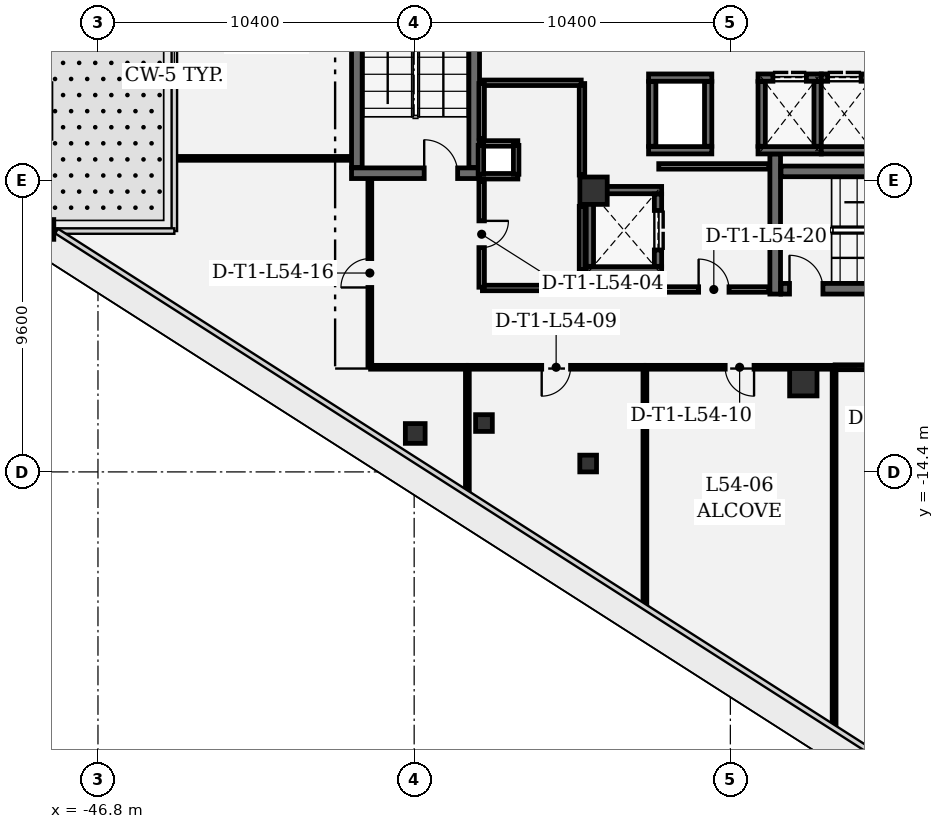
"""IFC4 building model, lengths in metres.
Left out: names, types, materials, properties, quantities, classifications, styles, units other than length and angle.
Written with IfcOpenShell. Run it as: python <this file> out.ifc"""

import sys

from ifc_helpers import new_model, si_unit, direction, frame, frame_2d, origin, origin_2d, place, context, subcontext, project, spatial, rectangle, extrude, element, fill, save


model = new_model("IFC4")
c1 = context("Model", 3, precision=1e-05, world=origin(), true_north=direction((0.0, 1.0)))
c2 = subcontext(c1, "Body", "Model", "MODEL_VIEW")
j1 = project(units=[si_unit("LENGTHUNIT", "METRE"), si_unit("PLANEANGLEUNIT", "RADIAN")], contexts=[c1])
p1 = place(None, origin())
s1 = spatial("IfcSite", under=j1, at=p1, CompositionType="ELEMENT")
p2 = place(p1, origin())
s2 = spatial("IfcBuilding", under=s1, at=p2, CompositionType="ELEMENT")
p3 = place(p2, frame((0.0, 0.0, 233.4)))
s3 = spatial("IfcBuildingStorey", under=s2, at=p3, CompositionType="ELEMENT", Elevation=233.4)
for number, where, z_axis, x_axis in (
    (1, (-23.6, -11.45, 0.0), (0.0, 0.0, 1.0), (1.0, 0.0, 0.0)),
    (2, (-30.5, -5.15, 0.0), (0.0, 0.0, 1.0), (1.0, 0.0, 0.0)),
):
    element("IfcColumn", number, at=place(p3, frame(where, z_axis=z_axis, x_axis=x_axis)), inside=s3, PredefinedType="COLUMN", context=c2, shape_type="SweptSolid", body=[
        extrude(rectangle(XDim=0.9, YDim=0.9, at=origin_2d()), origin(), (0.0, 0.0, 1.0), 4.05),
    ])
for number, where, z_axis, x_axis in (
    (3, (-48.578, -6.425, 0.0), (0.0, 0.0, 1.0), (1.0, 0.0, 0.0)),
    (4, (-36.365, -13.135, 0.0), (0.0, 0.0, 1.0), (1.0, 0.0, 0.0)),
):
    element("IfcColumn", number, at=place(p3, frame(where, z_axis=z_axis, x_axis=x_axis)), inside=s3, PredefinedType="COLUMN", context=c2, shape_type="SweptSolid", body=[
        extrude(rectangle(XDim=0.65, YDim=0.65, at=origin_2d()), origin(), (0.0, 0.0, 1.0), 4.05),
    ])
for number, where, z_axis, x_axis in (
    (5, (-34.104, -12.792, 0.0), (0.0, 0.0, 1.0), (1.0, 0.0, 0.0)),
    (6, (-30.677, -14.124, 0.0), (0.0, 0.0, 1.0), (1.0, 0.0, 0.0)),
):
    element("IfcColumn", number, at=place(p3, frame(where, z_axis=z_axis, x_axis=x_axis)), inside=s3, PredefinedType="COLUMN", context=c2, shape_type="SweptSolid", body=[
        extrude(rectangle(XDim=0.55, YDim=0.55, at=origin_2d()), origin(), (0.0, 0.0, 1.0), 4.05),
    ])
p4 = place(p3, frame((-24.525, -3.94, 0.0), z_axis=(0.0, 0.0, 1.0), x_axis=(0.0, -1.0, 0.0)))
e7 = element("IfcWall", 7, at=p4, inside=s3, PredefinedType="SHEAR", context=c2, shape_type="SweptSolid", body=[
    extrude(rectangle(XDim=4.61, YDim=0.35, at=frame_2d((2.305, 0.0))), origin(), (0.0, 0.0, 1.0), 3.78),
])
p5 = place(p3, frame((-24.335, -8.375, 0.0), z_axis=(0.0, 0.0, 1.0), x_axis=(1.0, 0.0, 0.0)))
e8 = element("IfcWall", 8, at=p5, inside=s3, PredefinedType="SHEAR", context=c2, shape_type="SweptSolid", body=[
    extrude(rectangle(XDim=8.12, YDim=0.35, at=frame_2d((4.06, 0.0))), origin(), (0.0, 0.0, 1.0), 3.78),
])
p6 = place(p5, frame((0.28, 0.0, 0.0)))
e9 = element("IfcOpeningElement", 9, at=p6, cuts=e8, PredefinedType="OPENING", context=c2, shape_type="SweptSolid", body=[
    extrude(rectangle(XDim=1.1, YDim=2.2, at=frame_2d((0.55, 1.1))), frame((0.0, 0.185, 0.0), z_axis=(0.0, -1.0, 0.0), x_axis=(1.0, 0.0, 0.0)), (0.0, 0.0, 1.0), 0.37),
])
p7 = place(p3, frame((-16.215, -4.515, 0.0), z_axis=(0.0, 0.0, 1.0), x_axis=(-1.0, 0.0, 0.0)))
e10 = element("IfcWall", 10, at=p7, inside=s3, PredefinedType="SHEAR", context=c2, shape_type="SweptSolid", body=[
    extrude(rectangle(XDim=8.12, YDim=0.35, at=frame_2d((4.06, 0.0))), origin(), (0.0, 0.0, 1.0), 3.78),
])
p8 = place(p3, frame((-38.46, -4.575, 0.0), z_axis=(0.0, 0.0, 1.0), x_axis=(1.0, 0.0, 0.0)))
e11 = element("IfcWall", 11, at=p8, inside=s3, PredefinedType="SHEAR", context=c2, shape_type="SweptSolid", body=[
    extrude(rectangle(XDim=4.21, YDim=0.35, at=frame_2d((2.105, 0.0))), origin(), (0.0, 0.0, 1.0), 3.78),
])
p9 = place(p8, frame((2.39, 0.0, 0.0)))
e12 = element("IfcOpeningElement", 12, at=p9, cuts=e11, PredefinedType="OPENING", context=c2, shape_type="SweptSolid", body=[
    extrude(rectangle(XDim=1.1, YDim=2.2, at=frame_2d((0.55, 1.1))), frame((0.0, 0.185, 0.0), z_axis=(0.0, -1.0, 0.0), x_axis=(1.0, 0.0, 0.0)), (0.0, 0.0, 1.0), 0.37),
])
for number, where, z_axis, x_axis in (
    (13, (-34.425, -4.385, 0.0), (0.0, 0.0, 1.0), (0.0, 1.0, 0.0)),
    (14, (-38.285, 4.385, 0.0), (0.0, 0.0, 1.0), (0.0, -1.0, 0.0)),
):
    element("IfcWall", number, at=place(p3, frame(where, z_axis=z_axis, x_axis=x_axis)), inside=s3, PredefinedType="SHEAR", context=c2, shape_type="SweptSolid", body=[
        extrude(rectangle(XDim=8.77, YDim=0.35, at=frame_2d((4.385, 0.0))), origin(), (0.0, 0.0, 1.0), 3.78),
    ])
for number, where, z_axis, x_axis in (
    (15, (-28.26, -7.77, 0.0), (0.0, 0.0, 1.0), (-1.0, 0.0, 0.0)),
    (16, (-30.74, -5.13, 0.0), (0.0, 0.0, 1.0), (1.0, 0.0, 0.0)),
):
    element("IfcWall", number, at=place(p3, frame(where, z_axis=z_axis, x_axis=x_axis)), inside=s3, PredefinedType="SHEAR", context=c2, shape_type="SweptSolid", body=[
        extrude(rectangle(XDim=2.48, YDim=0.24, at=frame_2d((1.24, 0.0))), origin(), (0.0, 0.0, 1.0), 3.78),
    ])
p10 = place(p3, frame((-30.62, -7.638, 0.0), z_axis=(0.0, 0.0, 1.0), x_axis=(0.0, 1.0, 0.0)))
e17 = element("IfcWall", 17, at=p10, inside=s3, PredefinedType="SHEAR", context=c2, shape_type="SweptSolid", body=[
    extrude(rectangle(XDim=2.376, YDim=0.24, at=frame_2d((1.188, 0.0))), origin(), (0.0, 0.0, 1.0), 3.78),
])
p11 = place(p3, frame((-28.38, -5.262, 0.0), z_axis=(0.0, 0.0, 1.0), x_axis=(0.0, -1.0, 0.0)))
e18 = element("IfcWall", 18, at=p11, inside=s3, PredefinedType="SHEAR", context=c2, shape_type="SweptSolid", body=[
    extrude(rectangle(XDim=2.376, YDim=0.24, at=frame_2d((1.188, 0.0))), origin(), (0.0, 0.0, 1.0), 3.78),
])
p12 = place(p11, frame((0.538, 0.0, 0.0)))
e19 = element("IfcOpeningElement", 19, at=p12, cuts=e18, PredefinedType="OPENING", context=c2, shape_type="SweptSolid", body=[
    extrude(rectangle(XDim=1.3, YDim=2.3, at=frame_2d((0.65, 1.15))), frame((0.0, 0.13, 0.0), z_axis=(0.0, -1.0, 0.0), x_axis=(1.0, 0.0, 0.0)), (0.0, 0.0, 1.0), 0.26),
])
for number, where, z_axis, x_axis in (
    (20, (-26.61, -3.82, 0.0), (0.0, 0.0, 1.0), (-1.0, 0.0, 0.0)),
    (21, (-28.69, -1.43, 0.0), (0.0, 0.0, 1.0), (1.0, 0.0, 0.0)),
):
    element("IfcWall", number, at=place(p3, frame(where, z_axis=z_axis, x_axis=x_axis)), inside=s3, PredefinedType="SHEAR", context=c2, shape_type="SweptSolid", body=[
        extrude(rectangle(XDim=2.08, YDim=0.24, at=frame_2d((1.04, 0.0))), origin(), (0.0, 0.0, 1.0), 3.78),
    ])
for number, where, z_axis, x_axis in (
    (22, (-28.57, -3.688, 0.0), (0.0, 0.0, 1.0), (0.0, 1.0, 0.0)),
    (23, (-26.73, -1.562, 0.0), (0.0, 0.0, 1.0), (0.0, -1.0, 0.0)),
):
    element("IfcWall", number, at=place(p3, frame(where, z_axis=z_axis, x_axis=x_axis)), inside=s3, PredefinedType="SHEAR", context=c2, shape_type="SweptSolid", body=[
        extrude(rectangle(XDim=2.126, YDim=0.24, at=frame_2d((1.063, 0.0))), origin(), (0.0, 0.0, 1.0), 3.78),
    ])
p13 = place(p3, frame((-23.01, -3.82, 0.0), z_axis=(0.0, 0.0, 1.0), x_axis=(-1.0, 0.0, 0.0)))
e24 = element("IfcWall", 24, at=p13, inside=s3, PredefinedType="SHEAR", context=c2, shape_type="SweptSolid", body=[
    extrude(rectangle(XDim=2.08, YDim=0.24, at=frame_2d((1.04, 0.0))), origin(), (0.0, 0.0, 1.0), 3.78),
])
p14 = place(p3, frame((-25.09, -1.43, 0.0), z_axis=(0.0, 0.0, 1.0), x_axis=(1.0, 0.0, 0.0)))
e25 = element("IfcWall", 25, at=p14, inside=s3, PredefinedType="SHEAR", context=c2, shape_type="SweptSolid", body=[
    extrude(rectangle(XDim=2.08, YDim=0.24, at=frame_2d((1.04, 0.0))), origin(), (0.0, 0.0, 1.0), 3.78),
])
p15 = place(p14, frame((0.49, 0.0, 0.0)))
e26 = element("IfcOpeningElement", 26, at=p15, cuts=e25, PredefinedType="OPENING", context=c2, shape_type="SweptSolid", body=[
    extrude(rectangle(XDim=1.1, YDim=2.2, at=frame_2d((0.55, 1.1))), frame((0.0, 0.13, 0.0), z_axis=(0.0, -1.0, 0.0), x_axis=(1.0, 0.0, 0.0)), (0.0, 0.0, 1.0), 0.26),
])
for number, where, z_axis, x_axis in (
    (27, (-24.97, -3.688, 0.0), (0.0, 0.0, 1.0), (0.0, 1.0, 0.0)),
    (28, (-23.13, -1.562, 0.0), (0.0, 0.0, 1.0), (0.0, -1.0, 0.0)),
):
    element("IfcWall", number, at=place(p3, frame(where, z_axis=z_axis, x_axis=x_axis)), inside=s3, PredefinedType="SHEAR", context=c2, shape_type="SweptSolid", body=[
        extrude(rectangle(XDim=2.126, YDim=0.24, at=frame_2d((1.063, 0.0))), origin(), (0.0, 0.0, 1.0), 3.78),
    ])
p16 = place(p3, frame((-21.21, -3.82, 0.0), z_axis=(0.0, 0.0, 1.0), x_axis=(-1.0, 0.0, 0.0)))
e29 = element("IfcWall", 29, at=p16, inside=s3, PredefinedType="SHEAR", context=c2, shape_type="SweptSolid", body=[
    extrude(rectangle(XDim=1.8, YDim=0.24, at=frame_2d((0.9, 0.0))), origin(), (0.0, 0.0, 1.0), 3.78),
])
p17 = place(p3, frame((-23.01, -1.43, 0.0), z_axis=(0.0, 0.0, 1.0), x_axis=(1.0, 0.0, 0.0)))
e30 = element("IfcWall", 30, at=p17, inside=s3, PredefinedType="SHEAR", context=c2, shape_type="SweptSolid", body=[
    extrude(rectangle(XDim=1.8, YDim=0.24, at=frame_2d((0.9, 0.0))), origin(), (0.0, 0.0, 1.0), 3.78),
])
p18 = place(p17, frame((0.21, 0.0, 0.0)))
e31 = element("IfcOpeningElement", 31, at=p18, cuts=e30, PredefinedType="OPENING", context=c2, shape_type="SweptSolid", body=[
    extrude(rectangle(XDim=1.1, YDim=2.2, at=frame_2d((0.55, 1.1))), frame((0.0, 0.13, 0.0), z_axis=(0.0, -1.0, 0.0), x_axis=(1.0, 0.0, 0.0)), (0.0, 0.0, 1.0), 0.26),
])
for number, where, z_axis, x_axis in (
    (32, (-32.99, -4.675, 0.0), (0.0, 0.0, 1.0), (-1.0, 0.0, 0.0)),
    (33, (-34.26, -3.595, 0.0), (0.0, 0.0, 1.0), (1.0, 0.0, 0.0)),
):
    element("IfcWall", number, at=place(p3, frame(where, z_axis=z_axis, x_axis=x_axis)), inside=s3, PredefinedType="PARTITIONING", context=c2, shape_type="SweptSolid", body=[
        extrude(rectangle(XDim=1.27, YDim=0.18, at=frame_2d((0.635, 0.0))), origin(), (0.0, 0.0, 1.0), 3.78),
    ])
for number, where, z_axis, x_axis in (
    (34, (-34.205, -4.61, 0.0), (0.0, 0.0, 1.0), (0.0, 1.0, 0.0)),
    (35, (-33.045, -3.66, 0.0), (0.0, 0.0, 1.0), (0.0, -1.0, 0.0)),
):
    element("IfcWall", number, at=place(p3, frame(where, z_axis=z_axis, x_axis=x_axis)), inside=s3, PredefinedType="PARTITIONING", context=c2, shape_type="SweptSolid", body=[
        extrude(rectangle(XDim=0.95, YDim=0.18, at=frame_2d((0.475, 0.0))), origin(), (0.0, 0.0, 1.0), 3.78),
    ])
p19 = place(p3, frame((-28.355, -8.4, 0.0), z_axis=(0.0, 0.0, 1.0), x_axis=(1.0, 0.0, 0.0)))
e36 = element("IfcWall", 36, at=p19, inside=s3, PredefinedType="PARTITIONING", context=c2, shape_type="SweptSolid", body=[
    extrude(rectangle(XDim=3.622, YDim=0.18, at=frame_2d((1.811, 0.0))), origin(), (0.0, 0.0, 1.0), 3.78),
])
p20 = place(p19, frame((1.311, 0.0, 0.0)))
e37 = element("IfcOpeningElement", 37, at=p20, cuts=e36, PredefinedType="OPENING", context=c2, shape_type="SweptSolid", body=[
    extrude(rectangle(XDim=1.0, YDim=2.15, at=frame_2d((0.5, 1.075))), frame((0.0, 0.1, 0.0), z_axis=(0.0, -1.0, 0.0), x_axis=(1.0, 0.0, 0.0)), (0.0, 0.0, 1.0), 0.2),
])
p21 = place(p3, frame((-24.733, -4.35, 0.0), z_axis=(0.0, 0.0, 1.0), x_axis=(-1.0, 0.0, 0.0)))
e38 = element("IfcWall", 38, at=p21, inside=s3, PredefinedType="PARTITIONING", context=c2, shape_type="SweptSolid", body=[
    extrude(rectangle(XDim=3.622, YDim=0.18, at=frame_2d((1.811, 0.0))), origin(), (0.0, 0.0, 1.0), 3.78),
])
p22 = place(p3, frame((-34.155, -8.35, 0.0), z_axis=(0.0, 0.0, 1.0), x_axis=(1.0, 0.0, 0.0)))
e39 = element("IfcWall", 39, at=p22, inside=s3, PredefinedType="PARTITIONING", context=c2, shape_type="SweptSolid", body=[
    extrude(rectangle(XDim=3.25, YDim=0.18, at=frame_2d((1.625, 0.0))), origin(), (0.0, 0.0, 1.0), 3.344),
])
p23 = place(p3, frame((-30.88, -7.743, 0.0), z_axis=(0.0, 0.0, 1.0), x_axis=(0.0, 1.0, 0.0)))
e40 = element("IfcWall", 40, at=p23, inside=s3, PredefinedType="PARTITIONING", context=c2, shape_type="SweptSolid", body=[
    extrude(rectangle(XDim=2.078, YDim=0.18, at=frame_2d((1.039, 0.0))), origin(), (0.0, 0.0, 1.0), 3.78),
])
p24 = place(p3, frame((-30.88, -4.635, 0.0), z_axis=(0.0, 0.0, 1.0), x_axis=(0.0, 1.0, 0.0)))
e41 = element("IfcWall", 41, at=p24, inside=s3, PredefinedType="PARTITIONING", context=c2, shape_type="SweptSolid", body=[
    extrude(rectangle(XDim=3.01, YDim=0.18, at=frame_2d((1.505, 0.0))), origin(), (0.0, 0.0, 1.0), 3.78),
])
p25 = place(p3, frame((-30.905, -1.6, 0.0), z_axis=(0.0, 0.0, 1.0), x_axis=(-1.0, 0.0, 0.0)))
e42 = element("IfcWall", 42, at=p25, inside=s3, PredefinedType="PARTITIONING", context=c2, shape_type="SweptSolid", body=[
    extrude(rectangle(XDim=3.25, YDim=0.18, at=frame_2d((1.625, 0.0))), origin(), (0.0, 0.0, 1.0), 3.78),
])
p26 = place(p3, frame((-34.18, -1.625, 0.0), z_axis=(0.0, 0.0, 1.0), x_axis=(0.0, -1.0, 0.0)))
e43 = element("IfcWall", 43, at=p26, inside=s3, PredefinedType="PARTITIONING", context=c2, shape_type="SweptSolid", body=[
    extrude(rectangle(XDim=1.805, YDim=0.18, at=frame_2d((0.902, 0.0))), origin(), (0.0, 0.0, 1.0), 3.78),
])
p27 = place(p3, frame((-34.18, -4.84, 0.0), z_axis=(0.0, 0.0, 1.0), x_axis=(0.0, -1.0, 0.0)))
e44 = element("IfcWall", 44, at=p27, inside=s3, PredefinedType="PARTITIONING", context=c2, shape_type="SweptSolid", body=[
    extrude(rectangle(XDim=3.485, YDim=0.18, at=frame_2d((1.743, 0.0))), origin(), (0.0, 0.0, 1.0), 3.78),
])
p28 = place(p27, frame((1.302, 0.0, 0.0)))
e45 = element("IfcOpeningElement", 45, at=p28, cuts=e44, PredefinedType="OPENING", context=c2, shape_type="SweptSolid", body=[
    extrude(rectangle(XDim=0.88, YDim=2.1, at=frame_2d((0.44, 1.05))), frame((0.0, 0.1, 0.0), z_axis=(0.0, -1.0, 0.0), x_axis=(1.0, 0.0, 0.0)), (0.0, 0.0, 1.0), 0.2),
])
p29 = place(p3, frame((-28.836, -10.958, 0.0), z_axis=(0.0, 0.0, 1.0), x_axis=(-1.0, 0.0, 0.0)))
e46 = element("IfcWall", 46, at=p29, inside=s3, PredefinedType="PARTITIONING", context=c2, shape_type="SweptSolid", body=[
    extrude(rectangle(XDim=5.789, YDim=0.125, at=frame_2d((2.895, 0.0))), origin(), (0.0, 0.0, 1.0), 3.0),
])
p30 = place(p29, frame((2.419, 0.0, 0.0)))
e47 = element("IfcOpeningElement", 47, at=p30, cuts=e46, PredefinedType="OPENING", context=c2, shape_type="SweptSolid", body=[
    extrude(rectangle(XDim=0.95, YDim=2.15, at=frame_2d((0.475, 1.075))), frame((0.0, 0.073, 0.0), z_axis=(0.0, -1.0, 0.0), x_axis=(1.0, 0.0, 0.0)), (0.0, 0.0, 1.0), 0.145),
])
p31 = place(p3, frame((-34.65, -10.983, 0.0), z_axis=(0.0, 0.0, 1.0), x_axis=(0.0, -1.0, 0.0)))
e48 = element("IfcWall", 48, at=p31, inside=s3, PredefinedType="PARTITIONING", context=c2, shape_type="SweptSolid", body=[
    extrude(rectangle(XDim=4.05, YDim=0.125, at=frame_2d((2.025, 0.0))), origin(), (0.0, 0.0, 1.0), 3.78),
])
p32 = place(p3, frame((-28.811, -18.765, 0.0), z_axis=(0.0, 0.0, 1.0), x_axis=(0.0, 1.0, 0.0)))
e49 = element("IfcWall", 49, at=p32, inside=s3, PredefinedType="PARTITIONING", context=c2, shape_type="SweptSolid", body=[
    extrude(rectangle(XDim=7.782, YDim=0.125, at=frame_2d((3.891, 0.0))), origin(), (0.0, 0.0, 1.0), 3.78),
])
p33 = place(p3, frame((-22.612, -10.958, 0.0), z_axis=(0.0, 0.0, 1.0), x_axis=(-1.0, 0.0, 0.0)))
e50 = element("IfcWall", 50, at=p33, inside=s3, PredefinedType="PARTITIONING", context=c2, shape_type="SweptSolid", body=[
    extrude(rectangle(XDim=6.166, YDim=0.125, at=frame_2d((3.083, 0.0))), origin(), (0.0, 0.0, 1.0), 3.78),
])
p34 = place(p33, frame((2.608, 0.0, 0.0)))
e51 = element("IfcOpeningElement", 51, at=p34, cuts=e50, PredefinedType="OPENING", context=c2, shape_type="SweptSolid", body=[
    extrude(rectangle(XDim=0.95, YDim=2.15, at=frame_2d((0.475, 1.075))), frame((0.0, 0.073, 0.0), z_axis=(0.0, -1.0, 0.0), x_axis=(1.0, 0.0, 0.0)), (0.0, 0.0, 1.0), 0.145),
])
p35 = place(p3, frame((-22.587, -22.742, 0.0), z_axis=(0.0, 0.0, 1.0), x_axis=(0.0, 1.0, 0.0)))
e52 = element("IfcWall", 52, at=p35, inside=s3, PredefinedType="PARTITIONING", context=c2, shape_type="SweptSolid", body=[
    extrude(rectangle(XDim=11.76, YDim=0.125, at=frame_2d((5.88, 0.0))), origin(), (0.0, 0.0, 1.0), 2.977),
])
p36 = place(p3, frame((-17.701, -10.958, 0.0), z_axis=(0.0, 0.0, 1.0), x_axis=(-1.0, 0.0, 0.0)))
e53 = element("IfcWall", 53, at=p36, inside=s3, PredefinedType="PARTITIONING", context=c2, shape_type="SweptSolid", body=[
    extrude(rectangle(XDim=4.853, YDim=0.16, at=frame_2d((2.427, 0.0))), origin(), (0.0, 0.0, 1.0), 3.344),
])
p37 = place(p36, frame((1.877, 0.0, 0.0)))
e54 = element("IfcOpeningElement", 54, at=p37, cuts=e53, PredefinedType="OPENING", context=c2, shape_type="SweptSolid", body=[
    extrude(rectangle(XDim=1.1, YDim=2.15, at=frame_2d((0.55, 1.075))), frame((0.0, 0.09, 0.0), z_axis=(0.0, -1.0, 0.0), x_axis=(1.0, 0.0, 0.0)), (0.0, 0.0, 1.0), 0.18),
])
p38 = place(p3, frame((-37.833, -10.958, 0.0), z_axis=(0.0, 0.0, 1.0), x_axis=(1.0, 0.0, 0.0)))
e55 = element("IfcWall", 55, at=p38, inside=s3, PredefinedType="PARTITIONING", context=c2, shape_type="SweptSolid", body=[
    extrude(rectangle(XDim=3.15, YDim=0.125, at=frame_2d((1.575, 0.0))), origin(), (0.0, 0.0, 1.0), 3.0),
])
p39 = place(p3, frame((-37.858, -10.933, 0.0), z_axis=(0.0, 0.0, 1.0), x_axis=(0.0, 1.0, 0.0)))
e56 = element("IfcWall", 56, at=p39, inside=s3, PredefinedType="PARTITIONING", context=c2, shape_type="SweptSolid", body=[
    extrude(rectangle(XDim=6.15, YDim=0.125, at=frame_2d((3.075, 0.0))), origin(), (0.0, 0.0, 1.0), 3.78),
])
p40 = place(p39, frame((2.6, 0.0, 0.0)))
e57 = element("IfcOpeningElement", 57, at=p40, cuts=e56, PredefinedType="OPENING", context=c2, shape_type="SweptSolid", body=[
    extrude(rectangle(XDim=0.95, YDim=2.15, at=frame_2d((0.475, 1.075))), frame((0.0, 0.073, 0.0), z_axis=(0.0, -1.0, 0.0), x_axis=(1.0, 0.0, 0.0)), (0.0, 0.0, 1.0), 0.145),
])
p41 = place(p3, frame((-38.493, -4.086, 0.0), z_axis=(0.0, 0.0, 1.0), x_axis=(-1.0, 0.0, 0.0)))
e58 = element("IfcWall", 58, at=p41, inside=s3, PredefinedType="PARTITIONING", context=c2, shape_type="SweptSolid", body=[
    extrude(rectangle(XDim=5.715, YDim=0.125, at=frame_2d((2.857, 0.0))), origin(), (0.0, 0.0, 1.0), 3.78),
])
p42 = place(p6, origin())
e59 = element("IfcDoor", 59, at=p42, inside=s3, OperationType="SINGLE_SWING_LEFT", PredefinedType="DOOR", context=c2, shape_type="SweptSolid", body=[
    extrude(rectangle(XDim=1.1, YDim=2.2, at=frame_2d((0.55, 1.1))), frame((0.0, 0.025, 0.0), z_axis=(0.0, -1.0, 0.0), x_axis=(1.0, 0.0, 0.0)), (0.0, 0.0, 1.0), 0.05),
])
fill(e9, e59)
p43 = place(p9, origin())
e60 = element("IfcDoor", 60, at=p43, inside=s3, OperationType="SINGLE_SWING_LEFT", PredefinedType="DOOR", context=c2, shape_type="SweptSolid", body=[
    extrude(rectangle(XDim=1.1, YDim=2.2, at=frame_2d((0.55, 1.1))), frame((0.0, 0.025, 0.0), z_axis=(0.0, -1.0, 0.0), x_axis=(1.0, 0.0, 0.0)), (0.0, 0.0, 1.0), 0.05),
])
fill(e12, e60)
p44 = place(p12, origin())
e61 = element("IfcDoor", 61, at=p44, inside=s3, OperationType="DOUBLE_DOOR_SLIDING", PredefinedType="DOOR", context=c2, shape_type="SweptSolid", body=[
    extrude(rectangle(XDim=1.3, YDim=2.3, at=frame_2d((0.65, 1.15))), frame((0.0, 0.025, 0.0), z_axis=(0.0, -1.0, 0.0), x_axis=(1.0, 0.0, 0.0)), (0.0, 0.0, 1.0), 0.05),
])
fill(e19, e61)
p45 = place(p15, origin())
e62 = element("IfcDoor", 62, at=p45, inside=s3, OperationType="DOUBLE_DOOR_SLIDING", PredefinedType="DOOR", context=c2, shape_type="SweptSolid", body=[
    extrude(rectangle(XDim=1.1, YDim=2.2, at=frame_2d((0.55, 1.1))), frame((0.0, 0.025, 0.0), z_axis=(0.0, -1.0, 0.0), x_axis=(1.0, 0.0, 0.0)), (0.0, 0.0, 1.0), 0.05),
])
fill(e26, e62)
p46 = place(p18, origin())
e63 = element("IfcDoor", 63, at=p46, inside=s3, OperationType="DOUBLE_DOOR_SLIDING", PredefinedType="DOOR", context=c2, shape_type="SweptSolid", body=[
    extrude(rectangle(XDim=1.1, YDim=2.2, at=frame_2d((0.55, 1.1))), frame((0.0, 0.025, 0.0), z_axis=(0.0, -1.0, 0.0), x_axis=(1.0, 0.0, 0.0)), (0.0, 0.0, 1.0), 0.05),
])
fill(e31, e63)
p47 = place(p28, origin())
e64 = element("IfcDoor", 64, at=p47, inside=s3, OperationType="SINGLE_SWING_LEFT", PredefinedType="DOOR", context=c2, shape_type="SweptSolid", body=[
    extrude(rectangle(XDim=0.88, YDim=2.1, at=frame_2d((0.44, 1.05))), frame((0.0, 0.025, 0.0), z_axis=(0.0, -1.0, 0.0), x_axis=(1.0, 0.0, 0.0)), (0.0, 0.0, 1.0), 0.05),
])
fill(e45, e64)
p48 = place(p30, origin())
e65 = element("IfcDoor", 65, at=p48, inside=s3, OperationType="SINGLE_SWING_RIGHT", PredefinedType="DOOR", context=c2, shape_type="SweptSolid", body=[
    extrude(rectangle(XDim=0.95, YDim=2.15, at=frame_2d((0.475, 1.075))), frame((0.0, 0.025, 0.0), z_axis=(0.0, -1.0, 0.0), x_axis=(1.0, 0.0, 0.0)), (0.0, 0.0, 1.0), 0.05),
])
fill(e47, e65)
p49 = place(p34, origin())
e66 = element("IfcDoor", 66, at=p49, inside=s3, OperationType="SINGLE_SWING_LEFT", PredefinedType="DOOR", context=c2, shape_type="SweptSolid", body=[
    extrude(rectangle(XDim=0.95, YDim=2.15, at=frame_2d((0.475, 1.075))), frame((0.0, 0.025, 0.0), z_axis=(0.0, -1.0, 0.0), x_axis=(1.0, 0.0, 0.0)), (0.0, 0.0, 1.0), 0.05),
])
fill(e51, e66)
p50 = place(p40, origin())
e67 = element("IfcDoor", 67, at=p50, inside=s3, OperationType="SINGLE_SWING_LEFT", PredefinedType="DOOR", context=c2, shape_type="SweptSolid", body=[
    extrude(rectangle(XDim=0.95, YDim=2.15, at=frame_2d((0.475, 1.075))), frame((0.0, 0.025, 0.0), z_axis=(0.0, -1.0, 0.0), x_axis=(1.0, 0.0, 0.0)), (0.0, 0.0, 1.0), 0.05),
])
fill(e57, e67)
p51 = place(p20, origin())
e68 = element("IfcDoor", 68, at=p51, inside=s3, OperationType="SINGLE_SWING_LEFT", PredefinedType="DOOR", context=c2, shape_type="SweptSolid", body=[
    extrude(rectangle(XDim=1.0, YDim=2.15, at=frame_2d((0.5, 1.075))), frame((0.0, 0.025, 0.0), z_axis=(0.0, -1.0, 0.0), x_axis=(1.0, 0.0, 0.0)), (0.0, 0.0, 1.0), 0.05),
])
fill(e37, e68)
save(model, sys.argv[1])
